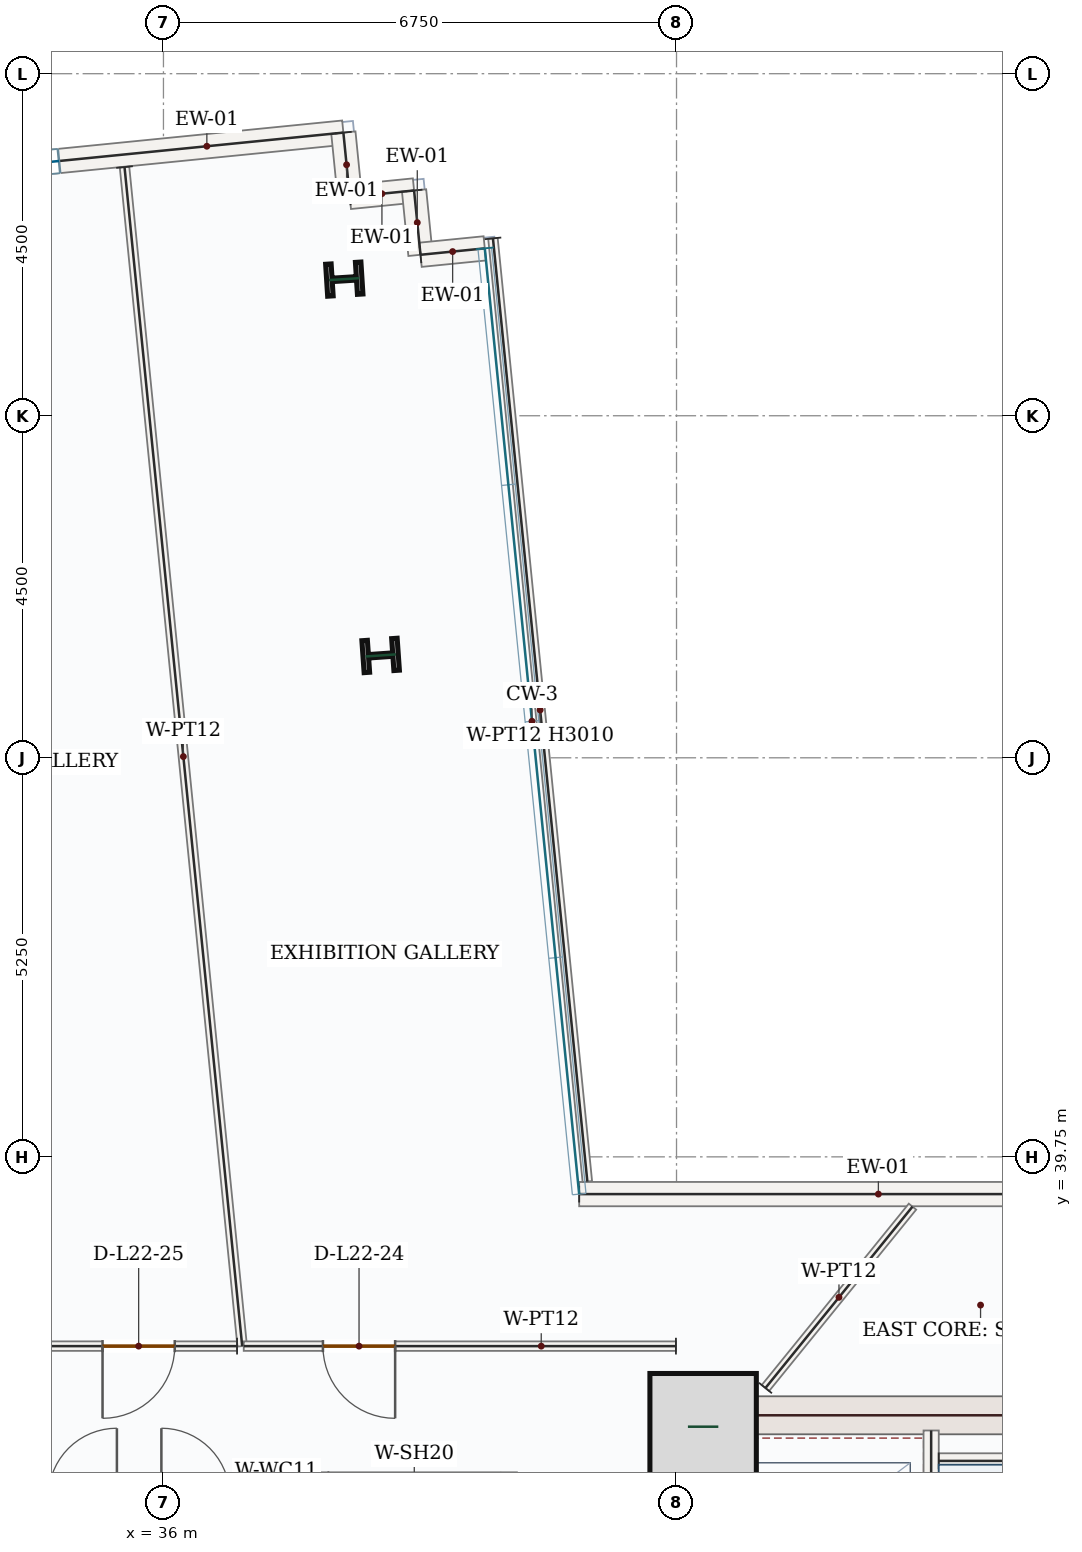
"""IFC4 building model, lengths in metres.
Left out: names, types, materials, properties, quantities, classifications, styles, units other than length and angle.
Written with IfcOpenShell. Run it as: python <this file> out.ifc"""

import sys

from ifc_helpers import new_model, si_unit, direction, frame, frame_2d, origin, origin_2d, place, context, subcontext, project, spatial, rectangle, i_section, extrude, source, transform, mapped, element, fill, save


model = new_model("IFC4")
c1 = context("Model", 3, precision=1e-05, world=origin(), true_north=direction((0.0, 1.0)))
c2 = subcontext(c1, "Body", "Model", "MODEL_VIEW")
j1 = project(units=[si_unit("LENGTHUNIT", "METRE"), si_unit("PLANEANGLEUNIT", "RADIAN")], contexts=[c1])
p1 = place(None, origin())
s1 = spatial("IfcSite", under=j1, at=p1, CompositionType="ELEMENT")
p2 = place(p1, origin())
s2 = spatial("IfcBuilding", under=s1, at=p2, CompositionType="ELEMENT")
p3 = place(p2, frame((0.0, 0.0, 100.5)))
s3 = spatial("IfcBuildingStorey", under=s2, at=p3, CompositionType="ELEMENT", Elevation=100.5)
p4 = place(p3, frame((43.0, 28.05, 0.0), z_axis=(0.0, 0.0, 1.0), x_axis=(0.0, 1.0, 0.0)))
e1 = element("IfcWall", 1, at=p4, inside=s3, PredefinedType="SHEAR", context=c2, shape_type="SweptSolid", body=[
    extrude(rectangle(XDim=8.55, YDim=0.5, at=frame_2d((4.275, 0.0))), origin(), (0.0, 0.0, 1.0), 3.95),
])
p5 = place(p4, frame((1.5, 0.0, 0.0)))
e2 = element("IfcOpeningElement", 2, at=p5, cuts=e1, PredefinedType="OPENING", context=c2, shape_type="SweptSolid", body=[
    extrude(rectangle(XDim=1.1, YDim=2.2, at=frame_2d((0.55, 1.1))), frame((0.0, 0.26, 0.0), z_axis=(0.0, -1.0, 0.0), x_axis=(1.0, 0.0, 0.0)), (0.0, 0.0, 1.0), 0.52),
])
m1 = source(origin(), c2, "Body", "SweptSolid", [
    extrude(rectangle(XDim=7.0, YDim=0.5, at=frame_2d((3.5, 0.0))), origin(), (0.0, 0.0, 1.0), 3.95),
])
p6 = place(p3, frame((43.25, 36.35, 0.0), z_axis=(0.0, 0.0, 1.0), x_axis=(1.0, 0.0, 0.0)))
e3 = element("IfcWall", 3, at=p6, inside=s3, PredefinedType="SHEAR", context=c2, shape_type="MappedRepresentation", body=[
    mapped(m1, transform((0.0, 0.0, 0.0), x_axis=(1.0, 0.0, 0.0), y_axis=(0.0, 1.0, 0.0), z_axis=(0.0, 0.0, 1.0), scale=1.0)),
])
m2 = source(origin(), c2, "Body", "SweptSolid", [
    extrude(rectangle(XDim=1.4, YDim=1.4, at=origin_2d()), origin(), (0.0, 0.0, 1.0), 4.2),
])
p7 = place(p3, frame((43.1, 36.2, 0.0), z_axis=(0.0, 0.0, 1.0), x_axis=(1.0, 0.0, 0.0)))
e4 = element("IfcColumn", 4, at=p7, inside=s3, PredefinedType="COLUMN", context=c2, shape_type="MappedRepresentation", body=[
    mapped(m2, transform((0.0, 0.0, 0.0), x_axis=(1.0, 0.0, 0.0), y_axis=(0.0, 1.0, 0.0), z_axis=(0.0, 0.0, 1.0), scale=1.0)),
])
m3 = source(origin(), c2, "Body", "SweptSolid", [
    extrude(i_section(OverallWidth=0.421, OverallDepth=0.465, WebThickness=0.045, FlangeThickness=0.073, FilletRadius=0.018, at=origin_2d()), origin(), (0.0, 0.0, 1.0), 4.2),
])
for number, where, z_axis, x_axis in (
    (5, (38.857, 46.346, 0.0), (0.0, 0.0, 1.0), (-0.07, 0.998, 0.0)),
    (6, (38.379, 51.297, 0.0), (0.0, 0.0, 1.0), (-0.063, 0.998, 0.0)),
):
    element("IfcColumn", number, at=place(p3, frame(where, z_axis=z_axis, x_axis=x_axis)), inside=s3, PredefinedType="COLUMN", context=c2, shape_type="MappedRepresentation", body=[
        mapped(m3, transform((0.0, 0.0, 0.0), x_axis=(1.0, 0.0, 0.0), y_axis=(0.0, 1.0, 0.0), z_axis=(0.0, 0.0, 1.0), scale=1.0)),
    ])
p8 = place(p3, frame((28.496, 52.24, 0.0), z_axis=(0.0, 0.0, 1.0), x_axis=(0.995054718915, 0.09932827576, 0.0)))
e7 = element("IfcWall", 7, at=p8, inside=s3, PredefinedType="SOLIDWALL", context=c2, shape_type="SweptSolid", body=[
    extrude(rectangle(XDim=9.92, YDim=0.32, at=frame_2d((4.96, 0.0))), origin(), (0.0, 0.0, 1.0), 3.95),
])
p9 = place(p8, frame((3.76, 0.0, 0.85)))
e8 = element("IfcOpeningElement", 8, at=p9, cuts=e7, PredefinedType="OPENING", context=c2, shape_type="SweptSolid", body=[
    extrude(rectangle(XDim=2.4, YDim=1.8, at=frame_2d((1.2, 0.9))), frame((0.0, 0.17, 0.0), z_axis=(0.0, -1.0, 0.0), x_axis=(1.0, 0.0, 0.0)), (0.0, 0.0, 1.0), 0.34),
])
m4 = source(origin(), c2, "Body", "SweptSolid", [
    extrude(rectangle(XDim=0.85, YDim=0.32, at=frame_2d((0.425, 0.0))), origin(), (0.0, 0.0, 1.0), 3.95),
])
for number, where, z_axis, x_axis in (
    (9, (38.367, 53.225, 0.0), (0.0, 0.0, 1.0), (0.099, -0.995, 0.0)),
    (10, (38.451, 52.379, 0.0), (0.0, 0.0, 1.0), (0.995, 0.099, 0.0)),
):
    element("IfcWall", number, at=place(p3, frame(where, z_axis=z_axis, x_axis=x_axis)), inside=s3, PredefinedType="SOLIDWALL", context=c2, shape_type="MappedRepresentation", body=[
        mapped(m4, transform((0.0, 0.0, 0.0), x_axis=(1.0, 0.0, 0.0), y_axis=(0.0, 1.0, 0.0), z_axis=(0.0, 0.0, 1.0), scale=1.0)),
    ])
m5 = source(origin(), c2, "Body", "SweptSolid", [
    extrude(rectangle(XDim=0.85, YDim=0.32, at=frame_2d((0.425, 0.0))), origin(), (0.0, 0.0, 1.0), 3.95),
])
p10 = place(p3, frame((39.297, 52.463, 0.0), z_axis=(0.0, 0.0, 1.0), x_axis=(0.099105525559, -0.995076929088, 0.0)))
e11 = element("IfcWall", 11, at=p10, inside=s3, PredefinedType="SOLIDWALL", context=c2, shape_type="MappedRepresentation", body=[
    mapped(m5, transform((0.0, 0.0, 0.0), x_axis=(1.0, 0.0, 0.0), y_axis=(0.0, 1.0, 0.0), z_axis=(0.0, 0.0, 1.0), scale=1.0)),
])
p11 = place(p3, frame((39.382, 51.618, 0.0), z_axis=(0.0, 0.0, 1.0), x_axis=(0.995079749343, 0.09907720448, 0.0)))
e12 = element("IfcWall", 12, at=p11, inside=s3, PredefinedType="SOLIDWALL", context=c2, shape_type="MappedRepresentation", body=[
    mapped(m4, transform((0.0, 0.0, 0.0), x_axis=(1.0, 0.0, 0.0), y_axis=(0.0, 1.0, 0.0), z_axis=(0.0, 0.0, 1.0), scale=1.0)),
])
m6 = source(origin(), c2, "Body", "SweptSolid", [
    extrude(rectangle(XDim=7.873, YDim=0.32, at=frame_2d((3.936, 0.0))), origin(), (0.0, 0.0, 1.0), 3.95),
])
p12 = place(p3, frame((41.469, 39.26, 0.0), z_axis=(0.0, 0.0, 1.0), x_axis=(1.0, 0.0, 0.0)))
e13 = element("IfcWall", 13, at=p12, inside=s3, PredefinedType="SOLIDWALL", context=c2, shape_type="MappedRepresentation", body=[
    mapped(m6, transform((0.0, 0.0, 0.0), x_axis=(1.0, 0.0, 0.0), y_axis=(0.0, 1.0, 0.0), z_axis=(0.0, 0.0, 1.0), scale=1.0)),
])
p13 = place(p3, frame((46.1, 28.15, 0.0), z_axis=(0.0, 0.0, 1.0), x_axis=(0.0, 1.0, 0.0)))
e14 = element("IfcWall", 14, at=p13, inside=s3, PredefinedType="SOLIDWALL", context=c2, shape_type="SweptSolid", body=[
    extrude(rectangle(XDim=8.0, YDim=0.2, at=frame_2d((4.0, 0.0))), origin(), (0.0, 0.0, 1.0), 3.95),
])
p14 = place(p13, frame((0.4, 0.0, 0.0)))
e15 = element("IfcOpeningElement", 15, at=p14, cuts=e14, PredefinedType="OPENING", context=c2, shape_type="SweptSolid", body=[
    extrude(rectangle(XDim=1.05, YDim=2.15, at=frame_2d((0.525, 1.075))), frame((0.0, 0.11, 0.0), z_axis=(0.0, -1.0, 0.0), x_axis=(1.0, 0.0, 0.0)), (0.0, 0.0, 1.0), 0.22),
])
m7 = source(origin(), c2, "Body", "SweptSolid", [
    extrude(rectangle(XDim=3.25, YDim=0.2, at=frame_2d((1.625, 0.0))), origin(), (0.0, 0.0, 1.0), 3.95),
])
p15 = place(p3, frame((46.2, 35.75, 0.0), z_axis=(0.0, 0.0, 1.0), x_axis=(1.0, 0.0, 0.0)))
e16 = element("IfcWall", 16, at=p15, inside=s3, PredefinedType="SOLIDWALL", context=c2, shape_type="MappedRepresentation", body=[
    mapped(m7, transform((0.0, 0.0, 0.0), x_axis=(1.0, 0.0, 0.0), y_axis=(0.0, 1.0, 0.0), z_axis=(0.0, 0.0, 1.0), scale=1.0)),
])
m8 = source(origin(), c2, "Body", "SweptSolid", [
    extrude(rectangle(XDim=2.4, YDim=0.2, at=frame_2d((1.2, 0.0))), origin(), (0.0, 0.0, 1.0), 3.95),
])
for number, where, z_axis, x_axis in (
    (17, (38.05, 33.2, 0.0), (0.0, 0.0, 1.0), (0.0, 1.0, 0.0)),
    (18, (40.55, 33.2, 0.0), (0.0, 0.0, 1.0), (0.0, 1.0, 0.0)),
):
    element("IfcWall", number, at=place(p3, frame(where, z_axis=z_axis, x_axis=x_axis)), inside=s3, PredefinedType="SOLIDWALL", context=c2, shape_type="MappedRepresentation", body=[
        mapped(m8, transform((0.0, 0.0, 0.0), x_axis=(1.0, 0.0, 0.0), y_axis=(0.0, 1.0, 0.0), z_axis=(0.0, 0.0, 1.0), scale=1.0)),
    ])
m9 = source(origin(), c2, "Body", "SweptSolid", [
    extrude(rectangle(XDim=3.072, YDim=0.125, at=frame_2d((1.536, 0.0))), origin(), (0.0, 0.0, 1.0), 3.95),
])
p16 = place(p3, frame((43.92, 36.709, 0.0), z_axis=(0.0, 0.0, 1.0), x_axis=(0.629760486176, 0.776789373029, 0.0)))
e19 = element("IfcWall", 19, at=p16, inside=s3, PredefinedType="PARTITIONING", context=c2, shape_type="MappedRepresentation", body=[
    mapped(m9, transform((0.0, 0.0, 0.0), x_axis=(1.0, 0.0, 0.0), y_axis=(0.0, 1.0, 0.0), z_axis=(0.0, 0.0, 1.0), scale=1.0)),
])
m10 = source(origin(), c2, "Body", "SweptSolid", [
    extrude(rectangle(XDim=15.589, YDim=0.125, at=frame_2d((7.794, 0.0))), origin(), (0.0, 0.0, 1.0), 3.95),
])
p17 = place(p3, frame((35.488, 52.771, 0.0), z_axis=(0.0, 0.0, 1.0), x_axis=(0.099325393126, -0.995055006661, 0.0)))
e20 = element("IfcWall", 20, at=p17, inside=s3, PredefinedType="PARTITIONING", context=c2, shape_type="MappedRepresentation", body=[
    mapped(m10, transform((0.0, 0.0, 0.0), x_axis=(1.0, 0.0, 0.0), y_axis=(0.0, 1.0, 0.0), z_axis=(0.0, 0.0, 1.0), scale=1.0)),
])
p18 = place(p3, frame((36.968, 37.26, 0.0), z_axis=(0.0, 0.0, 1.0), x_axis=(-1.0, 0.0, 0.0)))
e21 = element("IfcWall", 21, at=p18, inside=s3, PredefinedType="PARTITIONING", context=c2, shape_type="SweptSolid", body=[
    extrude(rectangle(XDim=4.676, YDim=0.125, at=frame_2d((2.338, 0.0))), origin(), (0.0, 0.0, 1.0), 3.95),
])
p19 = place(p18, frame((0.82, 0.0, 0.0)))
e22 = element("IfcOpeningElement", 22, at=p19, cuts=e21, PredefinedType="OPENING", context=c2, shape_type="SweptSolid", body=[
    extrude(rectangle(XDim=0.95, YDim=2.15, at=frame_2d((0.475, 1.075))), frame((0.0, 0.073, 0.0), z_axis=(0.0, -1.0, 0.0), x_axis=(1.0, 0.0, 0.0)), (0.0, 0.0, 1.0), 0.145),
])
p20 = place(p3, frame((42.742, 37.26, 0.0), z_axis=(0.0, 0.0, 1.0), x_axis=(-0.999999999078, 4.2935039e-05, 0.0)))
e23 = element("IfcWall", 23, at=p20, inside=s3, PredefinedType="PARTITIONING", context=c2, shape_type="SweptSolid", body=[
    extrude(rectangle(XDim=5.686, YDim=0.125, at=frame_2d((2.843, 0.0))), origin(), (0.0, 0.0, 1.0), 3.95),
])
p21 = place(p20, frame((3.694, 0.0, 0.0)))
e24 = element("IfcOpeningElement", 24, at=p21, cuts=e23, PredefinedType="OPENING", context=c2, shape_type="SweptSolid", body=[
    extrude(rectangle(XDim=0.95, YDim=2.15, at=frame_2d((0.475, 1.075))), frame((0.0, 0.073, 0.0), z_axis=(0.0, -1.0, 0.0), x_axis=(1.0, 0.0, 0.0)), (0.0, 0.0, 1.0), 0.145),
])
m11 = source(origin(), c2, "Body", "SweptSolid", [
    extrude(rectangle(XDim=12.47, YDim=0.125, at=frame_2d((6.235, 0.0))), origin(), (0.0, 0.0, 1.0), 3.01),
])
p22 = place(p3, frame((40.335, 51.833, 0.0), z_axis=(0.0, 0.0, 1.0), x_axis=(0.099590945301, -0.99502846372, 0.0)))
e25 = element("IfcWall", 25, at=p22, inside=s3, PredefinedType="PARTITIONING", context=c2, shape_type="MappedRepresentation", body=[
    mapped(m11, transform((0.0, 0.0, 0.0), x_axis=(1.0, 0.0, 0.0), y_axis=(0.0, 1.0, 0.0), z_axis=(0.0, 0.0, 1.0), scale=1.0)),
])
m12 = source(origin(), c2, "Body", "SweptSolid", [
    extrude(rectangle(XDim=2.4, YDim=1.8, at=frame_2d((1.2, 0.9))), frame((0.0, 0.03, 0.0), z_axis=(0.0, -1.0, 0.0), x_axis=(1.0, 0.0, 0.0)), (0.0, 0.0, 1.0), 0.06),
])
p23 = place(p9, origin())
e26 = element("IfcWindow", 26, at=p23, inside=s3, PartitioningType="DOUBLE_PANEL_VERTICAL", PredefinedType="WINDOW", context=c2, shape_type="MappedRepresentation", body=[
    mapped(m12, transform((0.0, 0.0, 0.0), x_axis=(1.0, 0.0, 0.0), y_axis=(0.0, 1.0, 0.0), z_axis=(0.0, 0.0, 1.0), scale=1.0)),
])
fill(e8, e26)
m13 = source(origin(), c2, "Body", "SweptSolid", [
    extrude(rectangle(XDim=0.95, YDim=2.15, at=frame_2d((0.475, 1.075))), frame((0.0, 0.025, 0.0), z_axis=(0.0, -1.0, 0.0), x_axis=(1.0, 0.0, 0.0)), (0.0, 0.0, 1.0), 0.05),
])
p24 = place(p21, origin())
e27 = element("IfcDoor", 27, at=p24, inside=s3, OperationType="SINGLE_SWING_LEFT", PredefinedType="DOOR", context=c2, shape_type="MappedRepresentation", body=[
    mapped(m13, transform((0.0, 0.0, 0.0), x_axis=(1.0, 0.0, 0.0), y_axis=(0.0, 1.0, 0.0), z_axis=(0.0, 0.0, 1.0), scale=1.0)),
])
fill(e24, e27)
p25 = place(p19, origin())
e28 = element("IfcDoor", 28, at=p25, inside=s3, OperationType="SINGLE_SWING_RIGHT", PredefinedType="DOOR", context=c2, shape_type="MappedRepresentation", body=[
    mapped(m13, transform((0.0, 0.0, 0.0), x_axis=(1.0, 0.0, 0.0), y_axis=(0.0, 1.0, 0.0), z_axis=(0.0, 0.0, 1.0), scale=1.0)),
])
fill(e22, e28)
save(model, sys.argv[1])
